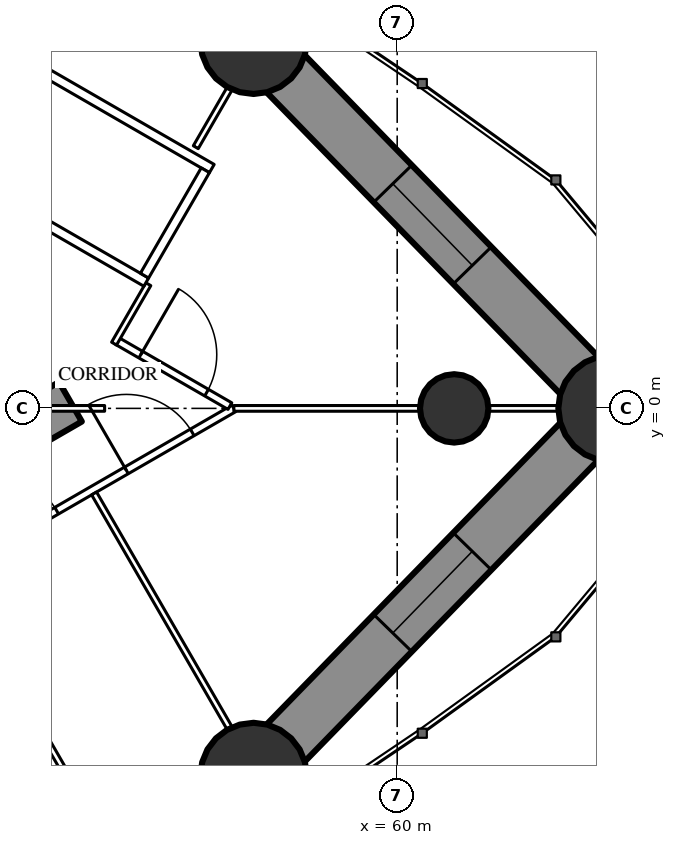
"""IFC4 building model, lengths in metres.
Left out: names, types, materials, properties, quantities, classifications, styles, units other than length and angle.
Written with IfcOpenShell. Run it as: python <this file> out.ifc"""

import sys

from ifc_helpers import new_model, si_unit, direction, frame, frame_2d, origin, origin_2d, place, context, subcontext, project, spatial, rectangle, circle, extrude, element, fill, save


model = new_model("IFC4")
c1 = context("Model", 3, precision=1e-05, world=origin(), true_north=direction((0.0, 1.0)))
c2 = subcontext(c1, "Body", "Model", "MODEL_VIEW")
j1 = project(units=[si_unit("LENGTHUNIT", "METRE"), si_unit("PLANEANGLEUNIT", "RADIAN")], contexts=[c1])
p1 = place(None, origin())
s1 = spatial("IfcSite", under=j1, at=p1, CompositionType="ELEMENT")
p2 = place(p1, origin())
s2 = spatial("IfcBuilding", under=s1, at=p2, CompositionType="ELEMENT")
p3 = place(p2, frame((0.0, 0.0, 201.8)))
s3 = spatial("IfcBuildingStorey", under=s2, at=p3, CompositionType="ELEMENT", Elevation=201.8)
for number, where, z_axis, x_axis in (
    (1, (65.64, 0.0, 0.0), (0.0, 0.0, 1.0), (1.0, 0.0, 0.0)),
    (2, (56.221, 9.672, 0.0), (0.0, 0.0, 1.0), (1.0, 0.0, 0.0)),
    (3, (56.221, -9.672, 0.0), (0.0, 0.0, 1.0), (1.0, 0.0, 0.0)),
):
    element("IfcColumn", number, at=place(p3, frame(where, z_axis=z_axis, x_axis=x_axis)), inside=s3, PredefinedType="COLUMN", context=c2, shape_type="SweptSolid", body=[
        extrude(circle(Radius=1.4, at=origin_2d()), origin(), (0.0, 0.0, 1.0), 3.5),
    ])
p4 = place(p3, frame((61.5, 0.0, 0.0), z_axis=(0.0, 0.0, 1.0), x_axis=(1.0, 0.0, 0.0)))
e4 = element("IfcColumn", 4, at=p4, inside=s3, PredefinedType="COLUMN", context=c2, shape_type="SweptSolid", body=[
    extrude(circle(Radius=0.9, at=origin_2d()), origin(), (0.0, 0.0, 1.0), 3.5),
])
p5 = place(p3, frame((27.2, -13.8, 0.0), z_axis=(0.0, 0.0, 1.0), x_axis=(0.866027159892, 0.499996958321, 0.0)))
e5 = element("IfcWall", 5, at=p5, inside=s3, PredefinedType="SHEAR", context=c2, shape_type="SweptSolid", body=[
    extrude(rectangle(XDim=27.947, YDim=1.2, at=frame_2d((13.973, 0.0))), origin(), (0.0, 0.0, 1.0), 3.5),
])
p6 = place(p5, frame((6.5, 0.0, 0.0)))
e6 = element("IfcOpeningElement", 6, at=p6, cuts=e5, PredefinedType="OPENING", context=c2, shape_type="SweptSolid", body=[
    extrude(rectangle(XDim=1.0, YDim=2.2, at=frame_2d((0.5, 1.1))), frame((0.0, 0.61, 0.0), z_axis=(0.0, -1.0, 0.0), x_axis=(1.0, 0.0, 0.0)), (0.0, 0.0, 1.0), 1.22),
])
p7 = place(p5, frame((14.045, 0.0, 0.0)))
e7 = element("IfcOpeningElement", 7, at=p7, cuts=e5, PredefinedType="OPENING", context=c2, shape_type="SweptSolid", body=[
    extrude(rectangle(XDim=1.8, YDim=2.2, at=frame_2d((0.9, 1.1))), frame((0.0, 0.61, 0.0), z_axis=(0.0, -1.0, 0.0), x_axis=(1.0, 0.0, 0.0)), (0.0, 0.0, 1.0), 1.22),
])
p8 = place(p3, frame((52.594, -11.955, 0.0), z_axis=(0.0, 0.0, 1.0), x_axis=(0.846348902569, 0.532628890617, 0.0)))
e8 = element("IfcWall", 8, at=p8, inside=s3, PredefinedType="SHEAR", context=c2, shape_type="SweptSolid", body=[
    extrude(rectangle(XDim=4.285, YDim=1.4, at=frame_2d((2.143, 0.0))), origin(), (0.0, 0.0, 1.0), 3.5),
])
p9 = place(p3, frame((56.221, -9.672, 0.0), z_axis=(0.0, 0.0, 1.0), x_axis=(0.697649905443, 0.716438838587, 0.0)))
e9 = element("IfcWall", 9, at=p9, inside=s3, PredefinedType="SHEAR", context=c2, shape_type="SweptSolid", body=[
    extrude(rectangle(XDim=13.501, YDim=1.4, at=frame_2d((6.75, 0.0))), origin(), (0.0, 0.0, 1.0), 3.5),
])
p10 = place(p9, frame((5.25, 0.0, 0.6)))
e10 = element("IfcOpeningElement", 10, at=p10, cuts=e9, PredefinedType="OPENING", context=c2, shape_type="SweptSolid", body=[
    extrude(rectangle(XDim=3.0, YDim=1.2, at=frame_2d((1.5, 0.6))), frame((0.0, 0.71, 0.0), z_axis=(0.0, -1.0, 0.0), x_axis=(1.0, 0.0, 0.0)), (0.0, 0.0, 1.0), 1.42),
])
p11 = place(p3, frame((65.64, 0.0, 0.0), z_axis=(0.0, 0.0, 1.0), x_axis=(-0.697649905443, 0.716438838587, 0.0)))
e11 = element("IfcWall", 11, at=p11, inside=s3, PredefinedType="SHEAR", context=c2, shape_type="SweptSolid", body=[
    extrude(rectangle(XDim=13.501, YDim=1.4, at=frame_2d((6.75, 0.0))), origin(), (0.0, 0.0, 1.0), 3.5),
])
p12 = place(p11, frame((5.25, 0.0, 0.6)))
e12 = element("IfcOpeningElement", 12, at=p12, cuts=e11, PredefinedType="OPENING", context=c2, shape_type="SweptSolid", body=[
    extrude(rectangle(XDim=3.0, YDim=1.2, at=frame_2d((1.5, 0.6))), frame((0.0, 0.71, 0.0), z_axis=(0.0, -1.0, 0.0), x_axis=(1.0, 0.0, 0.0)), (0.0, 0.0, 1.0), 1.42),
])
p13 = place(p3, frame((56.221, 9.672, 0.0), z_axis=(0.0, 0.0, 1.0), x_axis=(-0.854692251129, 0.519135007353, 0.0)))
e13 = element("IfcWall", 13, at=p13, inside=s3, PredefinedType="SHEAR", context=c2, shape_type="SweptSolid", body=[
    extrude(rectangle(XDim=8.569, YDim=1.4, at=frame_2d((4.284, 0.0))), origin(), (0.0, 0.0, 1.0), 3.5),
])
p14 = place(p13, frame((2.784, 0.0, 0.6)))
e14 = element("IfcOpeningElement", 14, at=p14, cuts=e13, PredefinedType="OPENING", context=c2, shape_type="SweptSolid", body=[
    extrude(rectangle(XDim=3.0, YDim=1.2, at=frame_2d((1.5, 0.6))), frame((0.0, 0.71, 0.0), z_axis=(0.0, -1.0, 0.0), x_axis=(1.0, 0.0, 0.0)), (0.0, 0.0, 1.0), 1.42),
])
p15 = place(p3, frame((27.903, -16.05, 0.0), z_axis=(0.0, 0.0, 1.0), x_axis=(0.866022581743, 0.500004887887, 0.0)))
e15 = element("IfcWall", 15, at=p15, inside=s3, PredefinedType="PARTITIONING", context=c2, shape_type="SweptSolid", body=[
    extrude(rectangle(XDim=32.1, YDim=0.2, at=frame_2d((16.05, 0.0))), origin(), (0.0, 0.0, 1.0), 3.25),
])
p16 = place(p15, frame((5.212, 0.0, 0.0)))
e16 = element("IfcOpeningElement", 16, at=p16, cuts=e15, PredefinedType="OPENING", context=c2, shape_type="SweptSolid", body=[
    extrude(rectangle(XDim=2.0, YDim=2.4, at=frame_2d((1.0, 1.2))), frame((0.0, 0.11, 0.0), z_axis=(0.0, -1.0, 0.0), x_axis=(1.0, 0.0, 0.0)), (0.0, 0.0, 1.0), 0.22),
])
p17 = place(p15, frame((18.133, 0.0, 0.0)))
e17 = element("IfcOpeningElement", 17, at=p17, cuts=e15, PredefinedType="OPENING", context=c2, shape_type="SweptSolid", body=[
    extrude(rectangle(XDim=2.0, YDim=2.4, at=frame_2d((1.0, 1.2))), frame((0.0, 0.11, 0.0), z_axis=(0.0, -1.0, 0.0), x_axis=(1.0, 0.0, 0.0)), (0.0, 0.0, 1.0), 0.22),
])
p18 = place(p15, frame((24.717, 0.0, 0.0)))
e18 = element("IfcOpeningElement", 18, at=p18, cuts=e15, PredefinedType="OPENING", context=c2, shape_type="SweptSolid", body=[
    extrude(rectangle(XDim=2.0, YDim=2.4, at=frame_2d((1.0, 1.2))), frame((0.0, 0.11, 0.0), z_axis=(0.0, -1.0, 0.0), x_axis=(1.0, 0.0, 0.0)), (0.0, 0.0, 1.0), 0.22),
])
p19 = place(p15, frame((28.836, 0.0, 0.0)))
e19 = element("IfcOpeningElement", 19, at=p19, cuts=e15, PredefinedType="OPENING", context=c2, shape_type="SweptSolid", body=[
    extrude(rectangle(XDim=2.0, YDim=2.4, at=frame_2d((1.0, 1.2))), frame((0.0, 0.11, 0.0), z_axis=(0.0, -1.0, 0.0), x_axis=(1.0, 0.0, 0.0)), (0.0, 0.0, 1.0), 0.22),
])
p20 = place(p3, frame((48.275, -4.404, 0.0), z_axis=(0.0, 0.0, 1.0), x_axis=(0.500006004368, -0.866021937133, 0.0)))
e20 = element("IfcWall", 20, at=p20, inside=s3, PredefinedType="PARTITIONING", context=c2, shape_type="SweptSolid", body=[
    extrude(rectangle(XDim=7.279, YDim=0.15, at=frame_2d((3.64, 0.0))), origin(), (0.0, 0.0, 1.0), 2.05),
])
p21 = place(p3, frame((52.025, -2.238, 0.0), z_axis=(0.0, 0.0, 1.0), x_axis=(0.499983785035, -0.866034765296, 0.0)))
e21 = element("IfcWall", 21, at=p21, inside=s3, PredefinedType="PARTITIONING", context=c2, shape_type="SweptSolid", body=[
    extrude(rectangle(XDim=7.116, YDim=0.15, at=frame_2d((3.558, 0.0))), origin(), (0.0, 0.0, 1.0), 2.05),
])
p22 = place(p3, frame((55.702, 0.0, 0.0), z_axis=(0.0, 0.0, 1.0), x_axis=(1.0, 0.0, 0.0)))
e22 = element("IfcWall", 22, at=p22, inside=s3, PredefinedType="PARTITIONING", context=c2, shape_type="SweptSolid", body=[
    extrude(rectangle(XDim=8.518, YDim=0.15, at=frame_2d((4.259, 0.0))), origin(), (0.0, 0.0, 1.0), 2.05),
])
p23 = place(p3, frame((54.7, 6.872, 0.0), z_axis=(0.0, 0.0, 1.0), x_axis=(0.499989690894, 0.866031355668, 0.0)))
e23 = element("IfcWall", 23, at=p23, inside=s3, PredefinedType="PARTITIONING", context=c2, shape_type="SweptSolid", body=[
    extrude(rectangle(XDim=1.766, YDim=0.15, at=frame_2d((0.883, 0.0))), origin(), (0.0, 0.0, 1.0), 3.25),
])
p24 = place(p3, frame((52.639, 1.769, 0.0), z_axis=(0.0, 0.0, 1.0), x_axis=(0.866027340901, -0.4999966448, 0.0)))
e24 = element("IfcWall", 24, at=p24, inside=s3, PredefinedType="PARTITIONING", context=c2, shape_type="SweptSolid", body=[
    extrude(rectangle(XDim=3.417, YDim=0.2, at=frame_2d((1.708, 0.0))), origin(), (0.0, 0.0, 1.0), 3.25),
])
p25 = place(p24, frame((0.708, 0.0, 0.0)))
e25 = element("IfcOpeningElement", 25, at=p25, cuts=e24, PredefinedType="OPENING", context=c2, shape_type="SweptSolid", body=[
    extrude(rectangle(XDim=2.0, YDim=2.03, at=frame_2d((1.0, 1.015))), frame((0.0, 0.11, 0.0), z_axis=(0.0, -1.0, 0.0), x_axis=(1.0, 0.0, 0.0)), (0.0, 0.0, 1.0), 0.22),
])
p26 = place(p3, frame((52.55, 1.704, 0.0), z_axis=(0.0, 0.0, 1.0), x_axis=(0.499980071345, 0.866036909293, 0.0)))
e26 = element("IfcWall", 26, at=p26, inside=s3, PredefinedType="PARTITIONING", context=c2, shape_type="SweptSolid", body=[
    extrude(rectangle(XDim=1.805, YDim=0.15, at=frame_2d((0.902, 0.0))), origin(), (0.0, 0.0, 1.0), 3.25),
])
p27 = place(p3, frame((44.575, 0.0, 0.0), z_axis=(0.0, 0.0, 1.0), x_axis=(1.0, 0.0, 0.0)))
e27 = element("IfcWall", 27, at=p27, inside=s3, PredefinedType="PARTITIONING", context=c2, shape_type="SweptSolid", body=[
    extrude(rectangle(XDim=7.727, YDim=0.15, at=frame_2d((3.864, 0.0))), origin(), (0.0, 0.0, 1.0), 2.05),
])
for number, where, z_axis, x_axis in (
    (28, (47.681, 6.622, 0.0), (0.0, 0.0, 1.0), (0.866, -0.5, 0.0)),
    (29, (49.406, 9.611, 0.0), (0.0, 0.0, 1.0), (0.866, -0.5, 0.0)),
):
    element("IfcWall", number, at=place(p3, frame(where, z_axis=z_axis, x_axis=x_axis)), inside=s3, PredefinedType="PARTITIONING", context=c2, shape_type="SweptSolid", body=[
        extrude(rectangle(XDim=6.6, YDim=0.25, at=frame_2d((3.3, 0.0))), origin(), (0.0, 0.0, 1.0), 3.25),
    ])
p28 = place(p3, frame((53.352, 3.493, 0.0), z_axis=(0.0, 0.0, 1.0), x_axis=(0.499872130319, 0.866099216793, 0.0)))
e30 = element("IfcWall", 30, at=p28, inside=s3, PredefinedType="PARTITIONING", context=c2, shape_type="SweptSolid", body=[
    extrude(rectangle(XDim=3.2, YDim=0.25, at=frame_2d((1.6, 0.0))), origin(), (0.0, 0.0, 1.0), 3.25),
])
p29 = place(p10, origin())
e31 = element("IfcWindow", 31, at=p29, inside=s3, PartitioningType="SINGLE_PANEL", PredefinedType="WINDOW", context=c2, shape_type="SweptSolid", body=[
    extrude(rectangle(XDim=3.0, YDim=1.2, at=frame_2d((1.5, 0.6))), frame((0.0, 0.03, 0.0), z_axis=(0.0, -1.0, 0.0), x_axis=(1.0, 0.0, 0.0)), (0.0, 0.0, 1.0), 0.06),
])
fill(e10, e31)
p30 = place(p12, origin())
e32 = element("IfcWindow", 32, at=p30, inside=s3, PartitioningType="SINGLE_PANEL", PredefinedType="WINDOW", context=c2, shape_type="SweptSolid", body=[
    extrude(rectangle(XDim=3.0, YDim=1.2, at=frame_2d((1.5, 0.6))), frame((0.0, 0.03, 0.0), z_axis=(0.0, -1.0, 0.0), x_axis=(1.0, 0.0, 0.0)), (0.0, 0.0, 1.0), 0.06),
])
fill(e12, e32)
p31 = place(p18, origin())
e33 = element("IfcDoor", 33, at=p31, inside=s3, OperationType="DOUBLE_DOOR_SINGLE_SWING", PredefinedType="DOOR", context=c2, shape_type="SweptSolid", body=[
    extrude(rectangle(XDim=2.0, YDim=2.4, at=frame_2d((1.0, 1.2))), frame((0.0, 0.025, 0.0), z_axis=(0.0, -1.0, 0.0), x_axis=(1.0, 0.0, 0.0)), (0.0, 0.0, 1.0), 0.05),
])
fill(e18, e33)
p32 = place(p19, origin())
e34 = element("IfcDoor", 34, at=p32, inside=s3, OperationType="DOUBLE_DOOR_SINGLE_SWING", PredefinedType="DOOR", context=c2, shape_type="SweptSolid", body=[
    extrude(rectangle(XDim=2.0, YDim=2.4, at=frame_2d((1.0, 1.2))), frame((0.0, 0.025, 0.0), z_axis=(0.0, -1.0, 0.0), x_axis=(1.0, 0.0, 0.0)), (0.0, 0.0, 1.0), 0.05),
])
fill(e19, e34)
p33 = place(p25, origin())
e35 = element("IfcDoor", 35, at=p33, inside=s3, OperationType="DOUBLE_DOOR_SINGLE_SWING", PredefinedType="DOOR", context=c2, shape_type="SweptSolid", body=[
    extrude(rectangle(XDim=2.0, YDim=2.03, at=frame_2d((1.0, 1.015))), frame((0.0, 0.025, 0.0), z_axis=(0.0, -1.0, 0.0), x_axis=(1.0, 0.0, 0.0)), (0.0, 0.0, 1.0), 0.05),
])
fill(e25, e35)
save(model, sys.argv[1])
